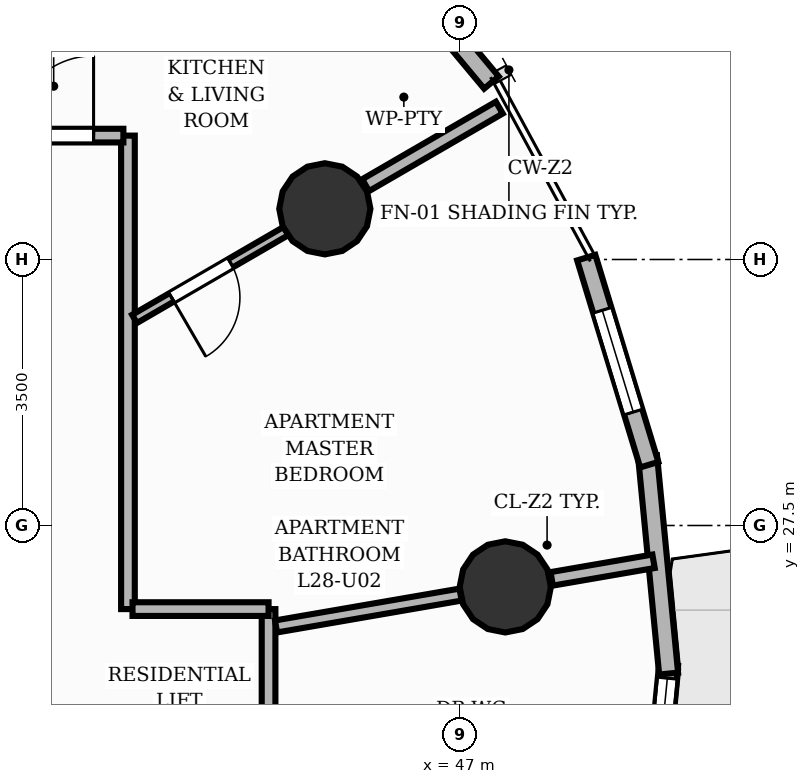
"""IFC4 building model, lengths in metres.
Left out: names, types, materials, properties, quantities, classifications, styles, units other than length and angle.
Written with IfcOpenShell. Run it as: python <this file> out.ifc"""

import sys

from ifc_helpers import new_model, si_unit, direction, frame, frame_2d, origin, origin_2d, place, context, subcontext, project, spatial, rectangle, circle, extrude, element, fill, save


model = new_model("IFC4")
c1 = context("Model", 3, precision=1e-05, world=origin(), true_north=direction((0.0, 1.0)))
c2 = subcontext(c1, "Body", "Model", "MODEL_VIEW")
j1 = project(units=[si_unit("LENGTHUNIT", "METRE"), si_unit("PLANEANGLEUNIT", "RADIAN")], contexts=[c1])
p1 = place(None, origin())
s1 = spatial("IfcSite", under=j1, at=p1, CompositionType="ELEMENT")
p2 = place(p1, origin())
s2 = spatial("IfcBuilding", under=s1, at=p2, CompositionType="ELEMENT")
p3 = place(p2, frame((0.0, 0.0, 96.48)))
s3 = spatial("IfcBuildingStorey", under=s2, at=p3, CompositionType="ELEMENT", Elevation=96.48)
for number, where, z_axis, x_axis in (
    (1, (47.594, 26.692, 0.0), (0.0, 0.0, 1.0), (1.0, 0.0, 0.0)),
    (2, (45.22, 31.667, 0.0), (0.0, 0.0, 1.0), (1.0, 0.0, 0.0)),
):
    element("IfcColumn", number, at=place(p3, frame(where, z_axis=z_axis, x_axis=x_axis)), inside=s3, PredefinedType="COLUMN", context=c2, shape_type="SweptSolid", body=[
        extrude(circle(Radius=0.6, at=origin_2d()), origin(), (0.0, 0.0, 1.0), 3.2),
    ])
p4 = place(p3, frame((45.572, 35.535, 0.0), z_axis=(0.0, 0.0, 1.0), x_axis=(0.640518566271, -0.76794268423, 0.0)))
e3 = element("IfcWall", 3, at=p4, inside=s3, PredefinedType="SOLIDWALL", context=c2, shape_type="SweptSolid", body=[
    extrude(rectangle(XDim=2.874, YDim=0.25, at=frame_2d((1.437, 0.0))), origin(), (0.0, 0.0, 1.0), 2.96),
])
p5 = place(p4, frame((0.612, 0.0, 0.85)))
e4 = element("IfcOpeningElement", 4, at=p5, cuts=e3, PredefinedType="OPENING", context=c2, shape_type="SweptSolid", body=[
    extrude(rectangle(XDim=1.65, YDim=1.55, at=frame_2d((0.825, 0.775))), frame((0.0, 0.135, 0.0), z_axis=(0.0, -1.0, 0.0), x_axis=(1.0, 0.0, 0.0)), (0.0, 0.0, 1.0), 0.27),
])
p6 = place(p3, frame((49.743, 25.665, 0.0), z_axis=(0.0, 0.0, 1.0), x_axis=(-0.096873982201, -0.995296655059, 0.0)))
e5 = element("IfcWall", 5, at=p6, inside=s3, PredefinedType="SOLIDWALL", context=c2, shape_type="SweptSolid", body=[
    extrude(rectangle(XDim=2.923, YDim=0.25, at=frame_2d((1.462, 0.0))), origin(), (0.0, 0.0, 1.0), 2.96),
])
p7 = place(p6, frame((0.175, 0.0, 0.85)))
e6 = element("IfcOpeningElement", 6, at=p7, cuts=e5, PredefinedType="OPENING", context=c2, shape_type="SweptSolid", body=[
    extrude(rectangle(XDim=1.4, YDim=1.55, at=frame_2d((0.7, 0.775))), frame((0.0, 0.135, 0.0), z_axis=(0.0, -1.0, 0.0), x_axis=(1.0, 0.0, 0.0)), (0.0, 0.0, 1.0), 0.27),
])
p8 = place(p3, frame((49.467, 28.412, 0.0), z_axis=(0.0, 0.0, 1.0), x_axis=(0.096332339466, -0.995349225334, 0.0)))
e7 = element("IfcWall", 7, at=p8, inside=s3, PredefinedType="SOLIDWALL", context=c2, shape_type="SweptSolid", body=[
    extrude(rectangle(XDim=2.874, YDim=0.25, at=frame_2d((1.437, 0.0))), origin(), (0.0, 0.0, 1.0), 2.96),
])
p9 = place(p3, frame((48.66, 31.024, 0.0), z_axis=(0.0, 0.0, 1.0), x_axis=(0.291144558409, -0.956679071637, 0.0)))
e8 = element("IfcWall", 8, at=p9, inside=s3, PredefinedType="SOLIDWALL", context=c2, shape_type="SweptSolid", body=[
    extrude(rectangle(XDim=2.848, YDim=0.25, at=frame_2d((1.424, 0.0))), origin(), (0.0, 0.0, 1.0), 2.96),
])
p10 = place(p9, frame((0.724, 0.0, 0.85)))
e9 = element("IfcOpeningElement", 9, at=p10, cuts=e8, PredefinedType="OPENING", context=c2, shape_type="SweptSolid", body=[
    extrude(rectangle(XDim=1.4, YDim=1.55, at=frame_2d((0.7, 0.775))), frame((0.0, 0.135, 0.0), z_axis=(0.0, -1.0, 0.0), x_axis=(1.0, 0.0, 0.0)), (0.0, 0.0, 1.0), 0.27),
])
p11 = place(p3, frame((48.206, 26.798, 0.0), z_axis=(0.0, 0.0, 1.0), x_axis=(0.98540615772, 0.170219576807, 0.0)))
e10 = element("IfcWall", 10, at=p11, inside=s3, PredefinedType="PARTITIONING", context=c2, shape_type="SweptSolid", body=[
    extrude(rectangle(XDim=1.36, YDim=0.18, at=frame_2d((0.68, 0.0))), origin(), (0.0, 0.0, 1.0), 2.26),
])
p12 = place(p3, frame((45.757, 31.978, 0.0), z_axis=(0.0, 0.0, 1.0), x_axis=(0.865025978628, 0.501727073516, 0.0)))
e11 = element("IfcWall", 11, at=p12, inside=s3, PredefinedType="PARTITIONING", context=c2, shape_type="SweptSolid", body=[
    extrude(rectangle(XDim=2.033, YDim=0.18, at=frame_2d((1.017, 0.0))), origin(), (0.0, 0.0, 1.0), 2.26),
])
p13 = place(p3, frame((44.48, 26.4, 0.0), z_axis=(0.0, 0.0, 1.0), x_axis=(0.0, -1.0, 0.0)))
e12 = element("IfcWall", 12, at=p13, inside=s3, PredefinedType="PARTITIONING", context=c2, shape_type="SweptSolid", body=[
    extrude(rectangle(XDim=4.8, YDim=0.18, at=frame_2d((2.4, 0.0))), origin(), (0.0, 0.0, 1.0), 2.955),
])
p14 = place(p13, frame((2.84, 0.0, 0.0)))
e13 = element("IfcOpeningElement", 13, at=p14, cuts=e12, PredefinedType="OPENING", context=c2, shape_type="SweptSolid", body=[
    extrude(rectangle(XDim=1.05, YDim=2.15, at=frame_2d((0.525, 1.075))), frame((0.0, 0.1, 0.0), z_axis=(0.0, -1.0, 0.0), x_axis=(1.0, 0.0, 0.0)), (0.0, 0.0, 1.0), 0.2),
])
p15 = place(p3, frame((42.63, 32.63, 0.0), z_axis=(0.0, 0.0, 1.0), x_axis=(0.0, -1.0, 0.0)))
e14 = element("IfcWall", 14, at=p15, inside=s3, PredefinedType="PARTITIONING", context=c2, shape_type="SweptSolid", body=[
    extrude(rectangle(XDim=6.23, YDim=0.18, at=frame_2d((3.115, 0.0))), origin(), (0.0, 0.0, 1.0), 2.955),
])
p16 = place(p3, frame((34.015, 32.63, 0.0), z_axis=(0.0, 0.0, 1.0), x_axis=(1.0, 0.0, 0.0)))
e15 = element("IfcWall", 15, at=p16, inside=s3, PredefinedType="PARTITIONING", context=c2, shape_type="SweptSolid", body=[
    extrude(rectangle(XDim=8.555, YDim=0.18, at=frame_2d((4.277, 0.0))), origin(), (0.0, 0.0, 1.0), 2.955),
])
p17 = place(p16, frame((7.112, 0.0, 0.0)))
e16 = element("IfcOpeningElement", 16, at=p17, cuts=e15, PredefinedType="OPENING", context=c2, shape_type="SweptSolid", body=[
    extrude(rectangle(XDim=1.05, YDim=2.15, at=frame_2d((0.525, 1.075))), frame((0.0, 0.1, 0.0), z_axis=(0.0, -1.0, 0.0), x_axis=(1.0, 0.0, 0.0)), (0.0, 0.0, 1.0), 0.2),
])
p18 = place(p3, frame((42.69, 26.4, 0.0), z_axis=(0.0, 0.0, 1.0), x_axis=(1.0, 0.0, 0.0)))
e17 = element("IfcWall", 17, at=p18, inside=s3, PredefinedType="PARTITIONING", context=c2, shape_type="SweptSolid", body=[
    extrude(rectangle(XDim=1.79, YDim=0.18, at=frame_2d((0.895, 0.0))), origin(), (0.0, 0.0, 1.0), 2.26),
])
p19 = place(p3, frame((44.579, 26.171, 0.0), z_axis=(0.0, 0.0, 1.0), x_axis=(0.985404570769, 0.170228763457, 0.0)))
e18 = element("IfcWall", 18, at=p19, inside=s3, PredefinedType="PLUMBINGWALL", context=c2, shape_type="SweptSolid", body=[
    extrude(rectangle(XDim=2.464, YDim=0.16, at=frame_2d((1.232, 0.0))), origin(), (0.0, 0.0, 1.0), 2.26),
])
p20 = place(p3, frame((39.991, 32.696, 0.0), z_axis=(0.0, 0.0, 1.0), x_axis=(0.750059872717, 0.661369932292, 0.0)))
e19 = element("IfcWall", 19, at=p20, inside=s3, PredefinedType="PLUMBINGWALL", context=c2, shape_type="SweptSolid", body=[
    extrude(rectangle(XDim=5.775, YDim=0.16, at=frame_2d((2.888, 0.0))), origin(), (0.0, 0.0, 1.0), 2.955),
])
p21 = place(p20, frame((3.278, 0.0, 0.0)))
e20 = element("IfcOpeningElement", 20, at=p21, cuts=e19, PredefinedType="OPENING", context=c2, shape_type="SweptSolid", body=[
    extrude(rectangle(XDim=0.9, YDim=2.1, at=frame_2d((0.45, 1.05))), frame((0.0, 0.09, 0.0), z_axis=(0.0, -1.0, 0.0), x_axis=(1.0, 0.0, 0.0)), (0.0, 0.0, 1.0), 0.18),
])
p22 = place(p3, frame((44.711, 31.375, 0.0), z_axis=(0.0, 0.0, 1.0), x_axis=(-0.864966854608, -0.501828995207, 0.0)))
e21 = element("IfcWall", 21, at=p22, inside=s3, PredefinedType="PARTITIONING", context=c2, shape_type="SweptSolid", body=[
    extrude(rectangle(XDim=2.306, YDim=0.125, at=frame_2d((1.153, 0.0))), origin(), (0.0, 0.0, 1.0), 2.26),
])
p23 = place(p22, frame((0.843, 0.0, 0.0)))
e22 = element("IfcOpeningElement", 22, at=p23, cuts=e21, PredefinedType="OPENING", context=c2, shape_type="SweptSolid", body=[
    extrude(rectangle(XDim=0.9, YDim=2.1, at=frame_2d((0.45, 1.05))), frame((0.0, 0.073, 0.0), z_axis=(0.0, -1.0, 0.0), x_axis=(1.0, 0.0, 0.0)), (0.0, 0.0, 1.0), 0.145),
])
p24 = place(p7, origin())
e23 = element("IfcWindow", 23, at=p24, inside=s3, PartitioningType="SINGLE_PANEL", PredefinedType="WINDOW", context=c2, shape_type="SweptSolid", body=[
    extrude(rectangle(XDim=1.4, YDim=1.55, at=frame_2d((0.7, 0.775))), frame((0.0, 0.03, 0.0), z_axis=(0.0, -1.0, 0.0), x_axis=(1.0, 0.0, 0.0)), (0.0, 0.0, 1.0), 0.06),
])
fill(e6, e23)
p25 = place(p10, origin())
e24 = element("IfcWindow", 24, at=p25, inside=s3, PartitioningType="SINGLE_PANEL", PredefinedType="WINDOW", context=c2, shape_type="SweptSolid", body=[
    extrude(rectangle(XDim=1.4, YDim=1.55, at=frame_2d((0.7, 0.775))), frame((0.0, 0.03, 0.0), z_axis=(0.0, -1.0, 0.0), x_axis=(1.0, 0.0, 0.0)), (0.0, 0.0, 1.0), 0.06),
])
fill(e9, e24)
p26 = place(p17, origin())
e25 = element("IfcDoor", 25, at=p26, inside=s3, OperationType="SINGLE_SWING_RIGHT", PredefinedType="DOOR", context=c2, shape_type="SweptSolid", body=[
    extrude(rectangle(XDim=1.05, YDim=2.15, at=frame_2d((0.525, 1.075))), frame((0.0, 0.025, 0.0), z_axis=(0.0, -1.0, 0.0), x_axis=(1.0, 0.0, 0.0)), (0.0, 0.0, 1.0), 0.05),
])
fill(e16, e25)
p27 = place(p23, origin())
e26 = element("IfcDoor", 26, at=p27, inside=s3, OperationType="SINGLE_SWING_RIGHT", PredefinedType="DOOR", context=c2, shape_type="SweptSolid", body=[
    extrude(rectangle(XDim=0.9, YDim=2.1, at=frame_2d((0.45, 1.05))), frame((0.0, 0.025, 0.0), z_axis=(0.0, -1.0, 0.0), x_axis=(1.0, 0.0, 0.0)), (0.0, 0.0, 1.0), 0.05),
])
fill(e22, e26)
save(model, sys.argv[1])
